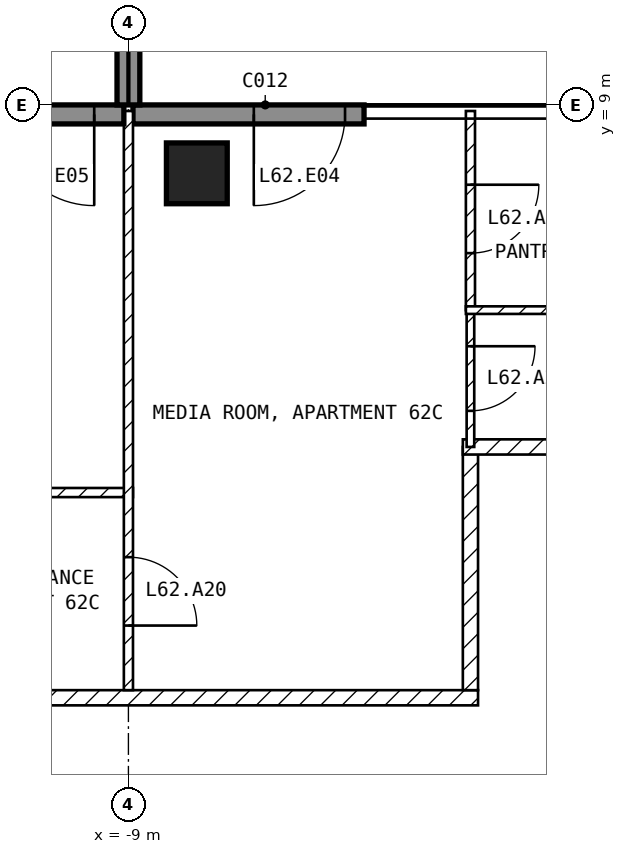
"""IFC4 building model, lengths in metres.
Left out: names, types, materials, properties, quantities, classifications, styles, units other than length and angle.
Written with IfcOpenShell. Run it as: python <this file> out.ifc"""

import sys

from ifc_helpers import new_model, si_unit, direction, frame, frame_2d, origin, origin_2d, place, context, subcontext, project, spatial, rectangle, extrude, element, fill, save


model = new_model("IFC4")
c1 = context("Model", 3, precision=1e-05, world=origin(), true_north=direction((0.0, 1.0)))
c2 = subcontext(c1, "Body", "Model", "MODEL_VIEW")
j1 = project(units=[si_unit("LENGTHUNIT", "METRE"), si_unit("PLANEANGLEUNIT", "RADIAN")], contexts=[c1])
p1 = place(None, origin())
s1 = spatial("IfcSite", under=j1, at=p1, CompositionType="ELEMENT")
p2 = place(p1, origin())
s2 = spatial("IfcBuilding", under=s1, at=p2, CompositionType="ELEMENT")
p3 = place(p2, frame((0.0, 0.0, 246.5)))
s3 = spatial("IfcBuildingStorey", under=s2, at=p3, CompositionType="ELEMENT", Elevation=246.5)
p4 = place(p3, frame((-8.1, 8.1, -0.25), z_axis=(0.0, 0.0, 1.0), x_axis=(1.0, 0.0, 0.0)))
e1 = element("IfcColumn", 1, at=p4, inside=s3, PredefinedType="COLUMN", context=c2, shape_type="SweptSolid", body=[
    extrude(rectangle(XDim=0.8, YDim=0.8, at=origin_2d()), origin(), (0.0, 0.0, 1.0), 3.5),
])
p5 = place(p3, frame((-5.9, 8.875, 0.0), z_axis=(0.0, 0.0, 1.0), x_axis=(-1.0, 0.0, 0.0)))
e2 = element("IfcWall", 2, at=p5, inside=s3, PredefinedType="SOLIDWALL", context=c2, shape_type="SweptSolid", body=[
    extrude(rectangle(XDim=3.04, YDim=0.25, at=frame_2d((1.52, 0.0))), origin(), (0.0, 0.0, 1.0), 3.25),
])
p6 = place(p5, frame((0.25, 0.0, 0.0)))
e3 = element("IfcOpeningElement", 3, at=p6, cuts=e2, PredefinedType="OPENING", context=c2, shape_type="SweptSolid", body=[
    extrude(rectangle(XDim=1.2, YDim=2.4, at=frame_2d((0.6, 1.2))), frame((0.0, 0.135, 0.0), z_axis=(0.0, -1.0, 0.0), x_axis=(1.0, 0.0, 0.0)), (0.0, 0.0, 1.0), 0.27),
])
p7 = place(p3, frame((-9.06, 8.875, 0.0), z_axis=(0.0, 0.0, 1.0), x_axis=(-1.0, 0.0, 0.0)))
e4 = element("IfcWall", 4, at=p7, inside=s3, PredefinedType="SOLIDWALL", context=c2, shape_type="SweptSolid", body=[
    extrude(rectangle(XDim=1.84, YDim=0.25, at=frame_2d((0.92, 0.0))), origin(), (0.0, 0.0, 1.0), 3.25),
])
p8 = place(p7, frame((0.39, 0.0, 0.0)))
e5 = element("IfcOpeningElement", 5, at=p8, cuts=e4, PredefinedType="OPENING", context=c2, shape_type="SweptSolid", body=[
    extrude(rectangle(XDim=1.2, YDim=2.4, at=frame_2d((0.6, 1.2))), frame((0.0, 0.135, 0.0), z_axis=(0.0, -1.0, 0.0), x_axis=(1.0, 0.0, 0.0)), (0.0, 0.0, 1.0), 0.27),
])
p9 = place(p3, frame((-9.0, 9.0, 0.0), z_axis=(0.0, 0.0, 1.0), x_axis=(0.0, 1.0, 0.0)))
e6 = element("IfcWall", 6, at=p9, inside=s3, PredefinedType="SOLIDWALL", context=c2, shape_type="SweptSolid", body=[
    extrude(rectangle(XDim=2.7, YDim=0.3, at=frame_2d((1.35, 0.0))), origin(), (0.0, 0.0, 1.0), 3.25),
])
p10 = place(p3, frame((-21.6, 1.2, 0.0), z_axis=(0.0, 0.0, 1.0), x_axis=(1.0, 0.0, 0.0)))
e7 = element("IfcWall", 7, at=p10, inside=s3, PredefinedType="PARTITIONING", context=c2, shape_type="SweptSolid", body=[
    extrude(rectangle(XDim=17.2, YDim=0.2, at=frame_2d((8.6, 0.0))), origin(), (0.0, 0.0, 1.0), 3.25),
])
p11 = place(p10, frame((10.3, 0.0, 0.0)))
e8 = element("IfcOpeningElement", 8, at=p11, cuts=e7, PredefinedType="OPENING", context=c2, shape_type="SweptSolid", body=[
    extrude(rectangle(XDim=1.0, YDim=2.1, at=frame_2d((0.5, 1.05))), frame((0.0, 0.11, 0.0), z_axis=(0.0, -1.0, 0.0), x_axis=(1.0, 0.0, 0.0)), (0.0, 0.0, 1.0), 0.22),
])
p12 = place(p3, frame((-4.5, 1.3, 0.0), z_axis=(0.0, 0.0, 1.0), x_axis=(0.0, 1.0, 0.0)))
e9 = element("IfcWall", 9, at=p12, inside=s3, PredefinedType="PARTITIONING", context=c2, shape_type="SweptSolid", body=[
    extrude(rectangle(XDim=3.2, YDim=0.2, at=frame_2d((1.6, 0.0))), origin(), (0.0, 0.0, 1.0), 3.25),
])
p13 = place(p3, frame((-4.6, 4.5, 0.0), z_axis=(0.0, 0.0, 1.0), x_axis=(1.0, 0.0, 0.0)))
e10 = element("IfcWall", 10, at=p13, inside=s3, PredefinedType="PARTITIONING", context=c2, shape_type="SweptSolid", body=[
    extrude(rectangle(XDim=3.5, YDim=0.2, at=frame_2d((1.75, 0.0))), origin(), (0.0, 0.0, 1.0), 3.25),
])
p14 = place(p3, frame((-17.4, 3.9, 0.0), z_axis=(0.0, 0.0, 1.0), x_axis=(1.0, 0.0, 0.0)))
e11 = element("IfcWall", 11, at=p14, inside=s3, PredefinedType="PARTITIONING", context=c2, shape_type="SweptSolid", body=[
    extrude(rectangle(XDim=8.46, YDim=0.12, at=frame_2d((4.23, 0.0))), origin(), (0.0, 0.0, 1.0), 3.25),
])
p15 = place(p14, frame((0.45, 0.0, 0.0)))
e12 = element("IfcOpeningElement", 12, at=p15, cuts=e11, PredefinedType="OPENING", context=c2, shape_type="SweptSolid", body=[
    extrude(rectangle(XDim=0.9, YDim=2.1, at=frame_2d((0.45, 1.05))), frame((0.0, 0.07, 0.0), z_axis=(0.0, -1.0, 0.0), x_axis=(1.0, 0.0, 0.0)), (0.0, 0.0, 1.0), 0.14),
])
p16 = place(p14, frame((6.15, 0.0, 0.0)))
e13 = element("IfcOpeningElement", 13, at=p16, cuts=e11, PredefinedType="OPENING", context=c2, shape_type="SweptSolid", body=[
    extrude(rectangle(XDim=0.9, YDim=2.1, at=frame_2d((0.45, 1.05))), frame((0.0, 0.07, 0.0), z_axis=(0.0, -1.0, 0.0), x_axis=(1.0, 0.0, 0.0)), (0.0, 0.0, 1.0), 0.14),
])
p17 = place(p3, frame((-9.0, 8.92, 0.0), z_axis=(0.0, 0.0, 1.0), x_axis=(0.0, -1.0, 0.0)))
e14 = element("IfcWall", 14, at=p17, inside=s3, PredefinedType="PARTITIONING", context=c2, shape_type="SweptSolid", body=[
    extrude(rectangle(XDim=7.62, YDim=0.12, at=frame_2d((3.81, 0.0))), origin(), (0.0, 0.0, 1.0), 3.25),
])
p18 = place(p17, frame((5.87, 0.0, 0.0)))
e15 = element("IfcOpeningElement", 15, at=p18, cuts=e14, PredefinedType="OPENING", context=c2, shape_type="SweptSolid", body=[
    extrude(rectangle(XDim=0.9, YDim=2.1, at=frame_2d((0.45, 1.05))), frame((0.0, 0.07, 0.0), z_axis=(0.0, -1.0, 0.0), x_axis=(1.0, 0.0, 0.0)), (0.0, 0.0, 1.0), 0.14),
])
p19 = place(p3, frame((-4.5, 6.3, 0.0), z_axis=(0.0, 0.0, 1.0), x_axis=(0.0, -1.0, 0.0)))
e16 = element("IfcWall", 16, at=p19, inside=s3, PredefinedType="PARTITIONING", context=c2, shape_type="SweptSolid", body=[
    extrude(rectangle(XDim=1.8, YDim=0.1, at=frame_2d((0.9, 0.0))), origin(), (0.0, 0.0, 1.0), 3.25),
])
p20 = place(p19, frame((0.475, 0.0, 0.0)))
e17 = element("IfcOpeningElement", 17, at=p20, cuts=e16, PredefinedType="OPENING", context=c2, shape_type="SweptSolid", body=[
    extrude(rectangle(XDim=0.85, YDim=2.1, at=frame_2d((0.425, 1.05))), frame((0.0, 0.06, 0.0), z_axis=(0.0, -1.0, 0.0), x_axis=(1.0, 0.0, 0.0)), (0.0, 0.0, 1.0), 0.12),
])
p21 = place(p3, frame((-4.5, 8.92, 0.0), z_axis=(0.0, 0.0, 1.0), x_axis=(0.0, -1.0, 0.0)))
e18 = element("IfcWall", 18, at=p21, inside=s3, PredefinedType="PARTITIONING", context=c2, shape_type="SweptSolid", body=[
    extrude(rectangle(XDim=2.62, YDim=0.12, at=frame_2d((1.31, 0.0))), origin(), (0.0, 0.0, 1.0), 3.25),
])
p22 = place(p21, frame((0.97, 0.0, 0.0)))
e19 = element("IfcOpeningElement", 19, at=p22, cuts=e18, PredefinedType="OPENING", context=c2, shape_type="SweptSolid", body=[
    extrude(rectangle(XDim=0.9, YDim=2.1, at=frame_2d((0.45, 1.05))), frame((0.0, 0.07, 0.0), z_axis=(0.0, -1.0, 0.0), x_axis=(1.0, 0.0, 0.0)), (0.0, 0.0, 1.0), 0.14),
])
p23 = place(p3, frame((-4.56, 6.3, 0.0), z_axis=(0.0, 0.0, 1.0), x_axis=(1.0, 0.0, 0.0)))
e20 = element("IfcWall", 20, at=p23, inside=s3, PredefinedType="PARTITIONING", context=c2, shape_type="SweptSolid", body=[
    extrude(rectangle(XDim=3.46, YDim=0.1, at=frame_2d((1.73, 0.0))), origin(), (0.0, 0.0, 1.0), 3.25),
])
p24 = place(p6, origin())
e21 = element("IfcDoor", 21, at=p24, inside=s3, OperationType="SINGLE_SWING_RIGHT", PredefinedType="DOOR", context=c2, shape_type="SweptSolid", body=[
    extrude(rectangle(XDim=1.2, YDim=2.4, at=frame_2d((0.6, 1.2))), frame((0.0, 0.025, 0.0), z_axis=(0.0, -1.0, 0.0), x_axis=(1.0, 0.0, 0.0)), (0.0, 0.0, 1.0), 0.05),
])
fill(e3, e21)
p25 = place(p8, origin())
e22 = element("IfcDoor", 22, at=p25, inside=s3, OperationType="SINGLE_SWING_LEFT", PredefinedType="DOOR", context=c2, shape_type="SweptSolid", body=[
    extrude(rectangle(XDim=1.2, YDim=2.4, at=frame_2d((0.6, 1.2))), frame((0.0, 0.025, 0.0), z_axis=(0.0, -1.0, 0.0), x_axis=(1.0, 0.0, 0.0)), (0.0, 0.0, 1.0), 0.05),
])
fill(e5, e22)
p26 = place(p18, origin())
e23 = element("IfcDoor", 23, at=p26, inside=s3, OperationType="SINGLE_SWING_RIGHT", PredefinedType="DOOR", context=c2, shape_type="SweptSolid", body=[
    extrude(rectangle(XDim=0.9, YDim=2.1, at=frame_2d((0.45, 1.05))), frame((0.0, 0.025, 0.0), z_axis=(0.0, -1.0, 0.0), x_axis=(1.0, 0.0, 0.0)), (0.0, 0.0, 1.0), 0.05),
])
fill(e15, e23)
p27 = place(p22, origin())
e24 = element("IfcDoor", 24, at=p27, inside=s3, OperationType="SINGLE_SWING_LEFT", PredefinedType="DOOR", context=c2, shape_type="SweptSolid", body=[
    extrude(rectangle(XDim=0.9, YDim=2.1, at=frame_2d((0.45, 1.05))), frame((0.0, 0.025, 0.0), z_axis=(0.0, -1.0, 0.0), x_axis=(1.0, 0.0, 0.0)), (0.0, 0.0, 1.0), 0.05),
])
fill(e19, e24)
p28 = place(p20, origin())
e25 = element("IfcDoor", 25, at=p28, inside=s3, OperationType="SINGLE_SWING_LEFT", PredefinedType="DOOR", context=c2, shape_type="SweptSolid", body=[
    extrude(rectangle(XDim=0.85, YDim=2.1, at=frame_2d((0.425, 1.05))), frame((0.0, 0.025, 0.0), z_axis=(0.0, -1.0, 0.0), x_axis=(1.0, 0.0, 0.0)), (0.0, 0.0, 1.0), 0.05),
])
fill(e17, e25)
save(model, sys.argv[1])
